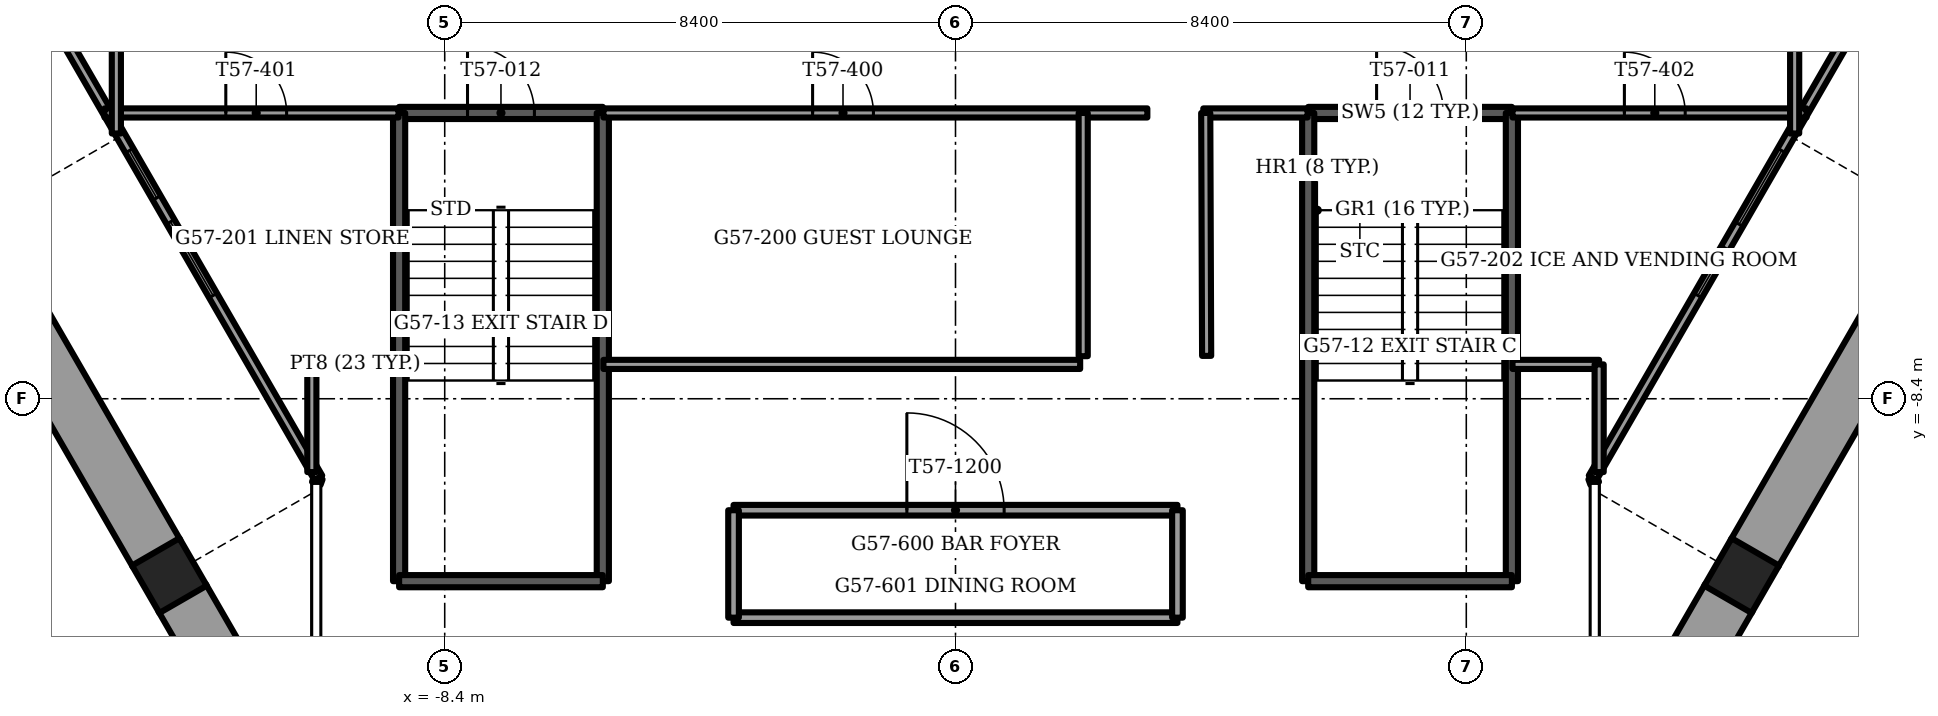
"""IFC4 building model, lengths in metres.
Left out: names, types, materials, properties, quantities, classifications, styles, units other than length and angle.
Written with IfcOpenShell. Run it as: python <this file> out.ifc"""

import sys

from ifc_helpers import new_model, si_unit, direction, frame, frame_2d, origin, origin_2d, place, context, subcontext, project, spatial, rectangle, extrude, element, fill, save


model = new_model("IFC4")
c1 = context("Model", 3, precision=1e-05, world=origin(), true_north=direction((0.0, 1.0)))
c2 = subcontext(c1, "Body", "Model", "MODEL_VIEW")
j1 = project(units=[si_unit("LENGTHUNIT", "METRE"), si_unit("PLANEANGLEUNIT", "RADIAN")], contexts=[c1])
p1 = place(None, origin())
s1 = spatial("IfcSite", under=j1, at=p1, CompositionType="ELEMENT")
p2 = place(p1, origin())
s2 = spatial("IfcBuilding", under=s1, at=p2, CompositionType="ELEMENT")
p3 = place(p2, frame((0.0, 0.0, 229.5)))
s3 = spatial("IfcBuildingStorey", under=s2, at=p3, CompositionType="ELEMENT", Elevation=229.5)
for number, where, z_axis, x_axis in (
    (1, (-12.928, -11.308, -1.2), (0.0, 0.0, 1.0), (-0.5, 0.866, 0.0)),
    (2, (12.928, -11.308, -1.2), (0.0, 0.0, 1.0), (-0.5, -0.866, 0.0)),
):
    element("IfcColumn", number, at=place(p3, frame(where, z_axis=z_axis, x_axis=x_axis)), inside=s3, PredefinedType="COLUMN", context=c2, shape_type="SweptSolid", body=[
        extrude(rectangle(XDim=0.9, YDim=0.9, at=origin_2d()), origin(), (0.0, 0.0, 1.0), 3.75),
    ])
p4 = place(p3, frame((-16.047, -5.906, 0.0), z_axis=(0.0, 0.0, 1.0), x_axis=(0.500015433515, -0.866016493057, 0.0)))
e3 = element("IfcWall", 3, at=p4, inside=s3, PredefinedType="PARAPET", context=c2, shape_type="SweptSolid", body=[
    extrude(rectangle(XDim=5.819, YDim=0.9, at=frame_2d((2.909, 0.0))), origin(), (0.0, 0.0, 1.0), 1.1),
])
for number, where, z_axis, x_axis in (
    (4, (-12.718, -11.672, 0.0), (0.0, 0.0, 1.0), (0.5, -0.866, 0.0)),
    (5, (10.161, -16.101, 0.0), (0.0, 0.0, 1.0), (0.5, 0.866, 0.0)),
):
    element("IfcWall", number, at=place(p3, frame(where, z_axis=z_axis, x_axis=x_axis)), inside=s3, PredefinedType="PARAPET", context=c2, shape_type="SweptSolid", body=[
        extrude(rectangle(XDim=5.114, YDim=0.9, at=frame_2d((2.557, 0.0))), origin(), (0.0, 0.0, 1.0), 1.1),
    ])
p5 = place(p3, frame((13.138, -10.945, 0.0), z_axis=(0.0, 0.0, 1.0), x_axis=(0.500015433515, 0.866016493057, 0.0)))
e6 = element("IfcWall", 6, at=p5, inside=s3, PredefinedType="PARAPET", context=c2, shape_type="SweptSolid", body=[
    extrude(rectangle(XDim=5.819, YDim=0.9, at=frame_2d((2.909, 0.0))), origin(), (0.0, 0.0, 1.0), 1.1),
])
p6 = place(p3, frame((-15.583, -0.86, 0.0), z_axis=(0.0, 0.0, 1.0), x_axis=(0.499995050918, -0.866028261119, 0.0)))
e7 = element("IfcWall", 7, at=p6, inside=s3, PredefinedType="SOLIDWALL", context=c2, shape_type="SweptSolid", body=[
    extrude(rectangle(XDim=10.208, YDim=0.15, at=frame_2d((5.104, 0.0))), origin(), (0.0, 0.0, 1.0), 3.45),
])
p7 = place(p6, frame((3.994, 0.0, 0.15)))
e8 = element("IfcOpeningElement", 8, at=p7, cuts=e7, PredefinedType="OPENING", context=c2, shape_type="SweptSolid", body=[
    extrude(rectangle(XDim=0.9, YDim=2.2, at=frame_2d((0.45, 1.1))), frame((0.0, 0.075, 0.0), z_axis=(0.0, -1.0, 0.0), x_axis=(1.0, 0.0, 0.0)), (0.0, 0.0, 1.0), 0.15),
])
p8 = place(p6, frame((5.347, 0.0, 0.15)))
e9 = element("IfcOpeningElement", 9, at=p8, cuts=e7, PredefinedType="OPENING", context=c2, shape_type="SweptSolid", body=[
    extrude(rectangle(XDim=1.4, YDim=2.2, at=frame_2d((0.7, 1.1))), frame((0.0, 0.075, 0.0), z_axis=(0.0, -1.0, 0.0), x_axis=(1.0, 0.0, 0.0)), (0.0, 0.0, 1.0), 0.15),
])
p9 = place(p3, frame((10.479, -9.7, 0.0), z_axis=(0.0, 0.0, 1.0), x_axis=(0.499995050918, 0.866028261119, 0.0)))
e10 = element("IfcWall", 10, at=p9, inside=s3, PredefinedType="SOLIDWALL", context=c2, shape_type="SweptSolid", body=[
    extrude(rectangle(XDim=10.208, YDim=0.15, at=frame_2d((5.104, 0.0))), origin(), (0.0, 0.0, 1.0), 3.45),
])
p10 = place(p9, frame((3.461, 0.0, 0.15)))
e11 = element("IfcOpeningElement", 11, at=p10, cuts=e10, PredefinedType="OPENING", context=c2, shape_type="SweptSolid", body=[
    extrude(rectangle(XDim=0.9, YDim=2.2, at=frame_2d((0.45, 1.1))), frame((0.0, 0.075, 0.0), z_axis=(0.0, -1.0, 0.0), x_axis=(1.0, 0.0, 0.0)), (0.0, 0.0, 1.0), 0.15),
])
p11 = place(p9, frame((4.814, 0.0, 0.15)))
e12 = element("IfcOpeningElement", 12, at=p11, cuts=e10, PredefinedType="OPENING", context=c2, shape_type="SweptSolid", body=[
    extrude(rectangle(XDim=1.4, YDim=2.2, at=frame_2d((0.7, 1.1))), frame((0.0, 0.075, 0.0), z_axis=(0.0, -1.0, 0.0), x_axis=(1.0, 0.0, 0.0)), (0.0, 0.0, 1.0), 0.15),
])
for number, where, z_axis, x_axis in (
    (13, (-10.479, -9.7, 0.0), (0.0, 0.0, 1.0), (-0.339, -0.941, 0.0)),
    (14, (10.479, -9.7, 0.0), (0.0, 0.0, 1.0), (0.339, -0.941, 0.0)),
):
    element("IfcWall", number, at=place(p3, frame(where, z_axis=z_axis, x_axis=x_axis)), inside=s3, PredefinedType="SOLIDWALL", context=c2, shape_type="SweptSolid", body=[
        extrude(rectangle(XDim=0.098, YDim=0.15, at=frame_2d((0.049, 0.0))), origin(), (0.0, 0.0, 1.0), 3.45),
    ])
p12 = place(p3, frame((5.8, -3.7, -0.3), z_axis=(0.0, 0.0, 1.0), x_axis=(1.0, 0.0, 0.0)))
e15 = element("IfcWall", 15, at=p12, inside=s3, PredefinedType="SOLIDWALL", context=c2, shape_type="SweptSolid", body=[
    extrude(rectangle(XDim=3.35, YDim=0.2, at=frame_2d((1.675, 0.0))), origin(), (0.0, 0.0, 1.0), 3.75),
])
p13 = place(p12, frame((1.125, 0.0, 0.0)))
e16 = element("IfcOpeningElement", 16, at=p13, cuts=e15, PredefinedType="OPENING", context=c2, shape_type="SweptSolid", body=[
    extrude(rectangle(XDim=1.1, YDim=2.1, at=frame_2d((0.55, 1.05))), frame((0.0, 0.1, 0.0), z_axis=(0.0, -1.0, 0.0), x_axis=(1.0, 0.0, 0.0)), (0.0, 0.0, 1.0), 0.2),
])
for number, where, z_axis, x_axis in (
    (17, (5.8, -3.7, -0.3), (0.0, 0.0, 1.0), (0.0, -1.0, 0.0)),
    (18, (9.15, -3.7, -0.3), (0.0, 0.0, 1.0), (0.0, -1.0, 0.0)),
):
    element("IfcWall", number, at=place(p3, frame(where, z_axis=z_axis, x_axis=x_axis)), inside=s3, PredefinedType="SOLIDWALL", context=c2, shape_type="SweptSolid", body=[
        extrude(rectangle(XDim=7.7, YDim=0.2, at=frame_2d((3.85, 0.0))), origin(), (0.0, 0.0, 1.0), 3.75),
    ])
p14 = place(p3, frame((5.8, -11.4, -0.3), z_axis=(0.0, 0.0, 1.0), x_axis=(1.0, 0.0, 0.0)))
e19 = element("IfcWall", 19, at=p14, inside=s3, PredefinedType="SOLIDWALL", context=c2, shape_type="SweptSolid", body=[
    extrude(rectangle(XDim=3.35, YDim=0.2, at=frame_2d((1.675, 0.0))), origin(), (0.0, 0.0, 1.0), 3.75),
])
p15 = place(p3, frame((-9.15, -3.7, -0.3), z_axis=(0.0, 0.0, 1.0), x_axis=(1.0, 0.0, 0.0)))
e20 = element("IfcWall", 20, at=p15, inside=s3, PredefinedType="SOLIDWALL", context=c2, shape_type="SweptSolid", body=[
    extrude(rectangle(XDim=3.35, YDim=0.2, at=frame_2d((1.675, 0.0))), origin(), (0.0, 0.0, 1.0), 3.75),
])
p16 = place(p15, frame((1.125, 0.0, 0.0)))
e21 = element("IfcOpeningElement", 21, at=p16, cuts=e20, PredefinedType="OPENING", context=c2, shape_type="SweptSolid", body=[
    extrude(rectangle(XDim=1.1, YDim=2.1, at=frame_2d((0.55, 1.05))), frame((0.0, 0.1, 0.0), z_axis=(0.0, -1.0, 0.0), x_axis=(1.0, 0.0, 0.0)), (0.0, 0.0, 1.0), 0.2),
])
for number, where, z_axis, x_axis in (
    (22, (-9.15, -3.7, -0.3), (0.0, 0.0, 1.0), (0.0, -1.0, 0.0)),
    (23, (-5.8, -3.7, -0.3), (0.0, 0.0, 1.0), (0.0, -1.0, 0.0)),
):
    element("IfcWall", number, at=place(p3, frame(where, z_axis=z_axis, x_axis=x_axis)), inside=s3, PredefinedType="SOLIDWALL", context=c2, shape_type="SweptSolid", body=[
        extrude(rectangle(XDim=7.7, YDim=0.2, at=frame_2d((3.85, 0.0))), origin(), (0.0, 0.0, 1.0), 3.75),
    ])
p17 = place(p3, frame((-9.15, -11.4, -0.3), z_axis=(0.0, 0.0, 1.0), x_axis=(1.0, 0.0, 0.0)))
e24 = element("IfcWall", 24, at=p17, inside=s3, PredefinedType="SOLIDWALL", context=c2, shape_type="SweptSolid", body=[
    extrude(rectangle(XDim=3.35, YDim=0.2, at=frame_2d((1.675, 0.0))), origin(), (0.0, 0.0, 1.0), 3.75),
])
p18 = place(p3, frame((-10.585, -7.835, 0.0), z_axis=(0.0, 0.0, 1.0), x_axis=(1.0, 0.0, 0.0)))
e25 = element("IfcWall", 25, at=p18, inside=s3, PredefinedType="PARTITIONING", context=c2, shape_type="SweptSolid", body=[
    extrude(rectangle(XDim=1.425, YDim=0.15, at=frame_2d((0.712, 0.0))), origin(), (0.0, 0.0, 1.0), 3.45),
])
p19 = place(p3, frame((-5.79, -7.835, 0.0), z_axis=(0.0, 0.0, 1.0), x_axis=(1.0, 0.0, 0.0)))
e26 = element("IfcWall", 26, at=p19, inside=s3, PredefinedType="PARTITIONING", context=c2, shape_type="SweptSolid", body=[
    extrude(rectangle(XDim=7.84, YDim=0.15, at=frame_2d((3.92, 0.0))), origin(), (0.0, 0.0, 1.0), 3.45),
])
p20 = place(p3, frame((9.16, -7.835, 0.0), z_axis=(0.0, 0.0, 1.0), x_axis=(1.0, 0.0, 0.0)))
e27 = element("IfcWall", 27, at=p20, inside=s3, PredefinedType="PARTITIONING", context=c2, shape_type="SweptSolid", body=[
    extrude(rectangle(XDim=1.425, YDim=0.15, at=frame_2d((0.712, 0.0))), origin(), (0.0, 0.0, 1.0), 3.45),
])
p21 = place(p3, frame((-13.995, -3.7, 0.0), z_axis=(0.0, 0.0, 1.0), x_axis=(1.0, 0.0, 0.0)))
e28 = element("IfcWall", 28, at=p21, inside=s3, PredefinedType="PARTITIONING", context=c2, shape_type="SweptSolid", body=[
    extrude(rectangle(XDim=4.835, YDim=0.15, at=frame_2d((2.417, 0.0))), origin(), (0.0, 0.0, 1.0), 3.45),
])
p22 = place(p21, frame((1.995, 0.0, 0.0)))
e29 = element("IfcOpeningElement", 29, at=p22, cuts=e28, PredefinedType="OPENING", context=c2, shape_type="SweptSolid", body=[
    extrude(rectangle(XDim=1.0, YDim=2.1, at=frame_2d((0.5, 1.05))), frame((0.0, 0.075, 0.0), z_axis=(0.0, -1.0, 0.0), x_axis=(1.0, 0.0, 0.0)), (0.0, 0.0, 1.0), 0.15),
])
p23 = place(p3, frame((-5.79, -3.7, 0.0), z_axis=(0.0, 0.0, 1.0), x_axis=(1.0, 0.0, 0.0)))
e30 = element("IfcWall", 30, at=p23, inside=s3, PredefinedType="PARTITIONING", context=c2, shape_type="SweptSolid", body=[
    extrude(rectangle(XDim=8.945, YDim=0.15, at=frame_2d((4.473, 0.0))), origin(), (0.0, 0.0, 1.0), 3.45),
])
p24 = place(p23, frame((3.44, 0.0, 0.0)))
e31 = element("IfcOpeningElement", 31, at=p24, cuts=e30, PredefinedType="OPENING", context=c2, shape_type="SweptSolid", body=[
    extrude(rectangle(XDim=1.0, YDim=2.1, at=frame_2d((0.5, 1.05))), frame((0.0, 0.075, 0.0), z_axis=(0.0, -1.0, 0.0), x_axis=(1.0, 0.0, 0.0)), (0.0, 0.0, 1.0), 0.15),
])
p25 = place(p3, frame((4.075, -3.7, 0.0), z_axis=(0.0, 0.0, 1.0), x_axis=(1.0, 0.0, 0.0)))
e32 = element("IfcWall", 32, at=p25, inside=s3, PredefinedType="PARTITIONING", context=c2, shape_type="SweptSolid", body=[
    extrude(rectangle(XDim=1.715, YDim=0.15, at=frame_2d((0.857, 0.0))), origin(), (0.0, 0.0, 1.0), 3.45),
])
p26 = place(p3, frame((9.16, -3.7, 0.0), z_axis=(0.0, 0.0, 1.0), x_axis=(1.0, 0.0, 0.0)))
e33 = element("IfcWall", 33, at=p26, inside=s3, PredefinedType="PARTITIONING", context=c2, shape_type="SweptSolid", body=[
    extrude(rectangle(XDim=4.835, YDim=0.15, at=frame_2d((2.417, 0.0))), origin(), (0.0, 0.0, 1.0), 3.45),
])
p27 = place(p26, frame((1.84, 0.0, 0.0)))
e34 = element("IfcOpeningElement", 34, at=p27, cuts=e33, PredefinedType="OPENING", context=c2, shape_type="SweptSolid", body=[
    extrude(rectangle(XDim=1.0, YDim=2.1, at=frame_2d((0.5, 1.05))), frame((0.0, 0.075, 0.0), z_axis=(0.0, -1.0, 0.0), x_axis=(1.0, 0.0, 0.0)), (0.0, 0.0, 1.0), 0.15),
])
p28 = place(p3, frame((13.8, -4.038, 0.0), z_axis=(0.0, 0.0, 1.0), x_axis=(0.0, 1.0, 0.0)))
e35 = element("IfcWall", 35, at=p28, inside=s3, PredefinedType="PARTITIONING", context=c2, shape_type="SweptSolid", body=[
    extrude(rectangle(XDim=2.338, YDim=0.15, at=frame_2d((1.169, 0.0))), origin(), (0.0, 0.0, 1.0), 3.45),
])
p29 = place(p3, frame((10.585, -9.606, 0.0), z_axis=(0.0, 0.0, 1.0), x_axis=(0.0, 1.0, 0.0)))
e36 = element("IfcWall", 36, at=p29, inside=s3, PredefinedType="PARTITIONING", context=c2, shape_type="SweptSolid", body=[
    extrude(rectangle(XDim=1.771, YDim=0.15, at=frame_2d((0.885, 0.0))), origin(), (0.0, 0.0, 1.0), 3.45),
])
p30 = place(p3, frame((2.1, -7.7, 0.0), z_axis=(0.0, 0.0, 1.0), x_axis=(0.0, 1.0, 0.0)))
e37 = element("IfcWall", 37, at=p30, inside=s3, PredefinedType="PARTITIONING", context=c2, shape_type="SweptSolid", body=[
    extrude(rectangle(XDim=4.0, YDim=0.15, at=frame_2d((2.0, 0.0))), origin(), (0.0, 0.0, 1.0), 3.45),
])
p31 = place(p3, frame((-10.585, -9.606, 0.0), z_axis=(0.0, 0.0, 1.0), x_axis=(0.0, 1.0, 0.0)))
e38 = element("IfcWall", 38, at=p31, inside=s3, PredefinedType="PARTITIONING", context=c2, shape_type="SweptSolid", body=[
    extrude(rectangle(XDim=1.771, YDim=0.15, at=frame_2d((0.885, 0.0))), origin(), (0.0, 0.0, 1.0), 3.45),
])
p32 = place(p3, frame((-13.8, -4.038, 0.0), z_axis=(0.0, 0.0, 1.0), x_axis=(0.0, 1.0, 0.0)))
e39 = element("IfcWall", 39, at=p32, inside=s3, PredefinedType="PARTITIONING", context=c2, shape_type="SweptSolid", body=[
    extrude(rectangle(XDim=2.338, YDim=0.15, at=frame_2d((1.169, 0.0))), origin(), (0.0, 0.0, 1.0), 3.45),
])
p33 = place(p3, frame((4.13, -7.695, 0.0), z_axis=(0.0, 0.0, 1.0), x_axis=(-0.003727669041, 0.999993052218, 0.0)))
e40 = element("IfcWall", 40, at=p33, inside=s3, PredefinedType="PARTITIONING", context=c2, shape_type="SweptSolid", body=[
    extrude(rectangle(XDim=3.995, YDim=0.15, at=frame_2d((1.998, 0.0))), origin(), (0.0, 0.0, 1.0), 3.45),
])
p34 = place(p3, frame((-3.65, -12.0, 0.0), z_axis=(0.0, 0.0, 1.0), x_axis=(1.0, 0.0, 0.0)))
e41 = element("IfcWall", 41, at=p34, inside=s3, PredefinedType="PARTITIONING", context=c2, shape_type="SweptSolid", body=[
    extrude(rectangle(XDim=7.3, YDim=0.175, at=frame_2d((3.65, 0.0))), origin(), (0.0, 0.0, 1.0), 3.45),
])
p35 = place(p3, frame((-3.65, -10.233, 0.0), z_axis=(0.0, 0.0, 1.0), x_axis=(1.0, 0.0, 0.0)))
e42 = element("IfcWall", 42, at=p35, inside=s3, PredefinedType="PARTITIONING", context=c2, shape_type="SweptSolid", body=[
    extrude(rectangle(XDim=7.3, YDim=0.175, at=frame_2d((3.65, 0.0))), origin(), (0.0, 0.0, 1.0), 3.45),
])
p36 = place(p35, frame((2.85, 0.0, 0.0)))
e43 = element("IfcOpeningElement", 43, at=p36, cuts=e42, PredefinedType="OPENING", context=c2, shape_type="SweptSolid", body=[
    extrude(rectangle(XDim=1.6, YDim=2.1, at=frame_2d((0.8, 1.05))), frame((0.0, 0.087, 0.0), z_axis=(0.0, -1.0, 0.0), x_axis=(1.0, 0.0, 0.0)), (0.0, 0.0, 1.0), 0.175),
])
for number, where, z_axis, x_axis in (
    (44, (-3.65, -12.0, 0.0), (0.0, 0.0, 1.0), (0.0, 1.0, 0.0)),
    (45, (3.65, -12.0, 0.0), (0.0, 0.0, 1.0), (0.0, 1.0, 0.0)),
):
    element("IfcWall", number, at=place(p3, frame(where, z_axis=z_axis, x_axis=x_axis)), inside=s3, PredefinedType="PARTITIONING", context=c2, shape_type="SweptSolid", body=[
        extrude(rectangle(XDim=1.767, YDim=0.175, at=frame_2d((0.883, 0.0))), origin(), (0.0, 0.0, 1.0), 3.45),
    ])
p37 = place(p7, origin())
e46 = element("IfcWindow", 46, at=p37, inside=s3, PartitioningType="SINGLE_PANEL", PredefinedType="WINDOW", context=c2, shape_type="SweptSolid", body=[
    extrude(rectangle(XDim=0.9, YDim=2.2, at=frame_2d((0.45, 1.1))), frame((0.0, 0.03, 0.0), z_axis=(0.0, -1.0, 0.0), x_axis=(1.0, 0.0, 0.0)), (0.0, 0.0, 1.0), 0.06),
])
fill(e8, e46)
p38 = place(p8, origin())
e47 = element("IfcWindow", 47, at=p38, inside=s3, PartitioningType="SINGLE_PANEL", PredefinedType="WINDOW", context=c2, shape_type="SweptSolid", body=[
    extrude(rectangle(XDim=1.4, YDim=2.2, at=frame_2d((0.7, 1.1))), frame((0.0, 0.03, 0.0), z_axis=(0.0, -1.0, 0.0), x_axis=(1.0, 0.0, 0.0)), (0.0, 0.0, 1.0), 0.06),
])
fill(e9, e47)
p39 = place(p10, origin())
e48 = element("IfcWindow", 48, at=p39, inside=s3, PartitioningType="SINGLE_PANEL", PredefinedType="WINDOW", context=c2, shape_type="SweptSolid", body=[
    extrude(rectangle(XDim=0.9, YDim=2.2, at=frame_2d((0.45, 1.1))), frame((0.0, 0.03, 0.0), z_axis=(0.0, -1.0, 0.0), x_axis=(1.0, 0.0, 0.0)), (0.0, 0.0, 1.0), 0.06),
])
fill(e11, e48)
p40 = place(p11, origin())
e49 = element("IfcWindow", 49, at=p40, inside=s3, PartitioningType="SINGLE_PANEL", PredefinedType="WINDOW", context=c2, shape_type="SweptSolid", body=[
    extrude(rectangle(XDim=1.4, YDim=2.2, at=frame_2d((0.7, 1.1))), frame((0.0, 0.03, 0.0), z_axis=(0.0, -1.0, 0.0), x_axis=(1.0, 0.0, 0.0)), (0.0, 0.0, 1.0), 0.06),
])
fill(e12, e49)
p41 = place(p13, origin())
e50 = element("IfcDoor", 50, at=p41, inside=s3, OperationType="SINGLE_SWING_LEFT", PredefinedType="DOOR", context=c2, shape_type="SweptSolid", body=[
    extrude(rectangle(XDim=1.1, YDim=2.1, at=frame_2d((0.55, 1.05))), frame((0.0, 0.025, 0.0), z_axis=(0.0, -1.0, 0.0), x_axis=(1.0, 0.0, 0.0)), (0.0, 0.0, 1.0), 0.05),
])
fill(e16, e50)
p42 = place(p16, origin())
e51 = element("IfcDoor", 51, at=p42, inside=s3, OperationType="SINGLE_SWING_LEFT", PredefinedType="DOOR", context=c2, shape_type="SweptSolid", body=[
    extrude(rectangle(XDim=1.1, YDim=2.1, at=frame_2d((0.55, 1.05))), frame((0.0, 0.025, 0.0), z_axis=(0.0, -1.0, 0.0), x_axis=(1.0, 0.0, 0.0)), (0.0, 0.0, 1.0), 0.05),
])
fill(e21, e51)
p43 = place(p24, origin())
e52 = element("IfcDoor", 52, at=p43, inside=s3, OperationType="SINGLE_SWING_RIGHT", PredefinedType="DOOR", context=c2, shape_type="SweptSolid", body=[
    extrude(rectangle(XDim=1.0, YDim=2.1, at=frame_2d((0.5, 1.05))), frame((0.0, 0.025, 0.0), z_axis=(0.0, -1.0, 0.0), x_axis=(1.0, 0.0, 0.0)), (0.0, 0.0, 1.0), 0.05),
])
fill(e31, e52)
p44 = place(p22, origin())
e53 = element("IfcDoor", 53, at=p44, inside=s3, OperationType="SINGLE_SWING_RIGHT", PredefinedType="DOOR", context=c2, shape_type="SweptSolid", body=[
    extrude(rectangle(XDim=1.0, YDim=2.1, at=frame_2d((0.5, 1.05))), frame((0.0, 0.025, 0.0), z_axis=(0.0, -1.0, 0.0), x_axis=(1.0, 0.0, 0.0)), (0.0, 0.0, 1.0), 0.05),
])
fill(e29, e53)
p45 = place(p27, origin())
e54 = element("IfcDoor", 54, at=p45, inside=s3, OperationType="SINGLE_SWING_LEFT", PredefinedType="DOOR", context=c2, shape_type="SweptSolid", body=[
    extrude(rectangle(XDim=1.0, YDim=2.1, at=frame_2d((0.5, 1.05))), frame((0.0, 0.025, 0.0), z_axis=(0.0, -1.0, 0.0), x_axis=(1.0, 0.0, 0.0)), (0.0, 0.0, 1.0), 0.05),
])
fill(e34, e54)
p46 = place(p36, origin())
e55 = element("IfcDoor", 55, at=p46, inside=s3, OperationType="DOUBLE_DOOR_SINGLE_SWING", PredefinedType="DOOR", context=c2, shape_type="SweptSolid", body=[
    extrude(rectangle(XDim=1.6, YDim=2.1, at=frame_2d((0.8, 1.05))), frame((0.0, 0.025, 0.0), z_axis=(0.0, -1.0, 0.0), x_axis=(1.0, 0.0, 0.0)), (0.0, 0.0, 1.0), 0.05),
])
fill(e43, e55)
save(model, sys.argv[1])
